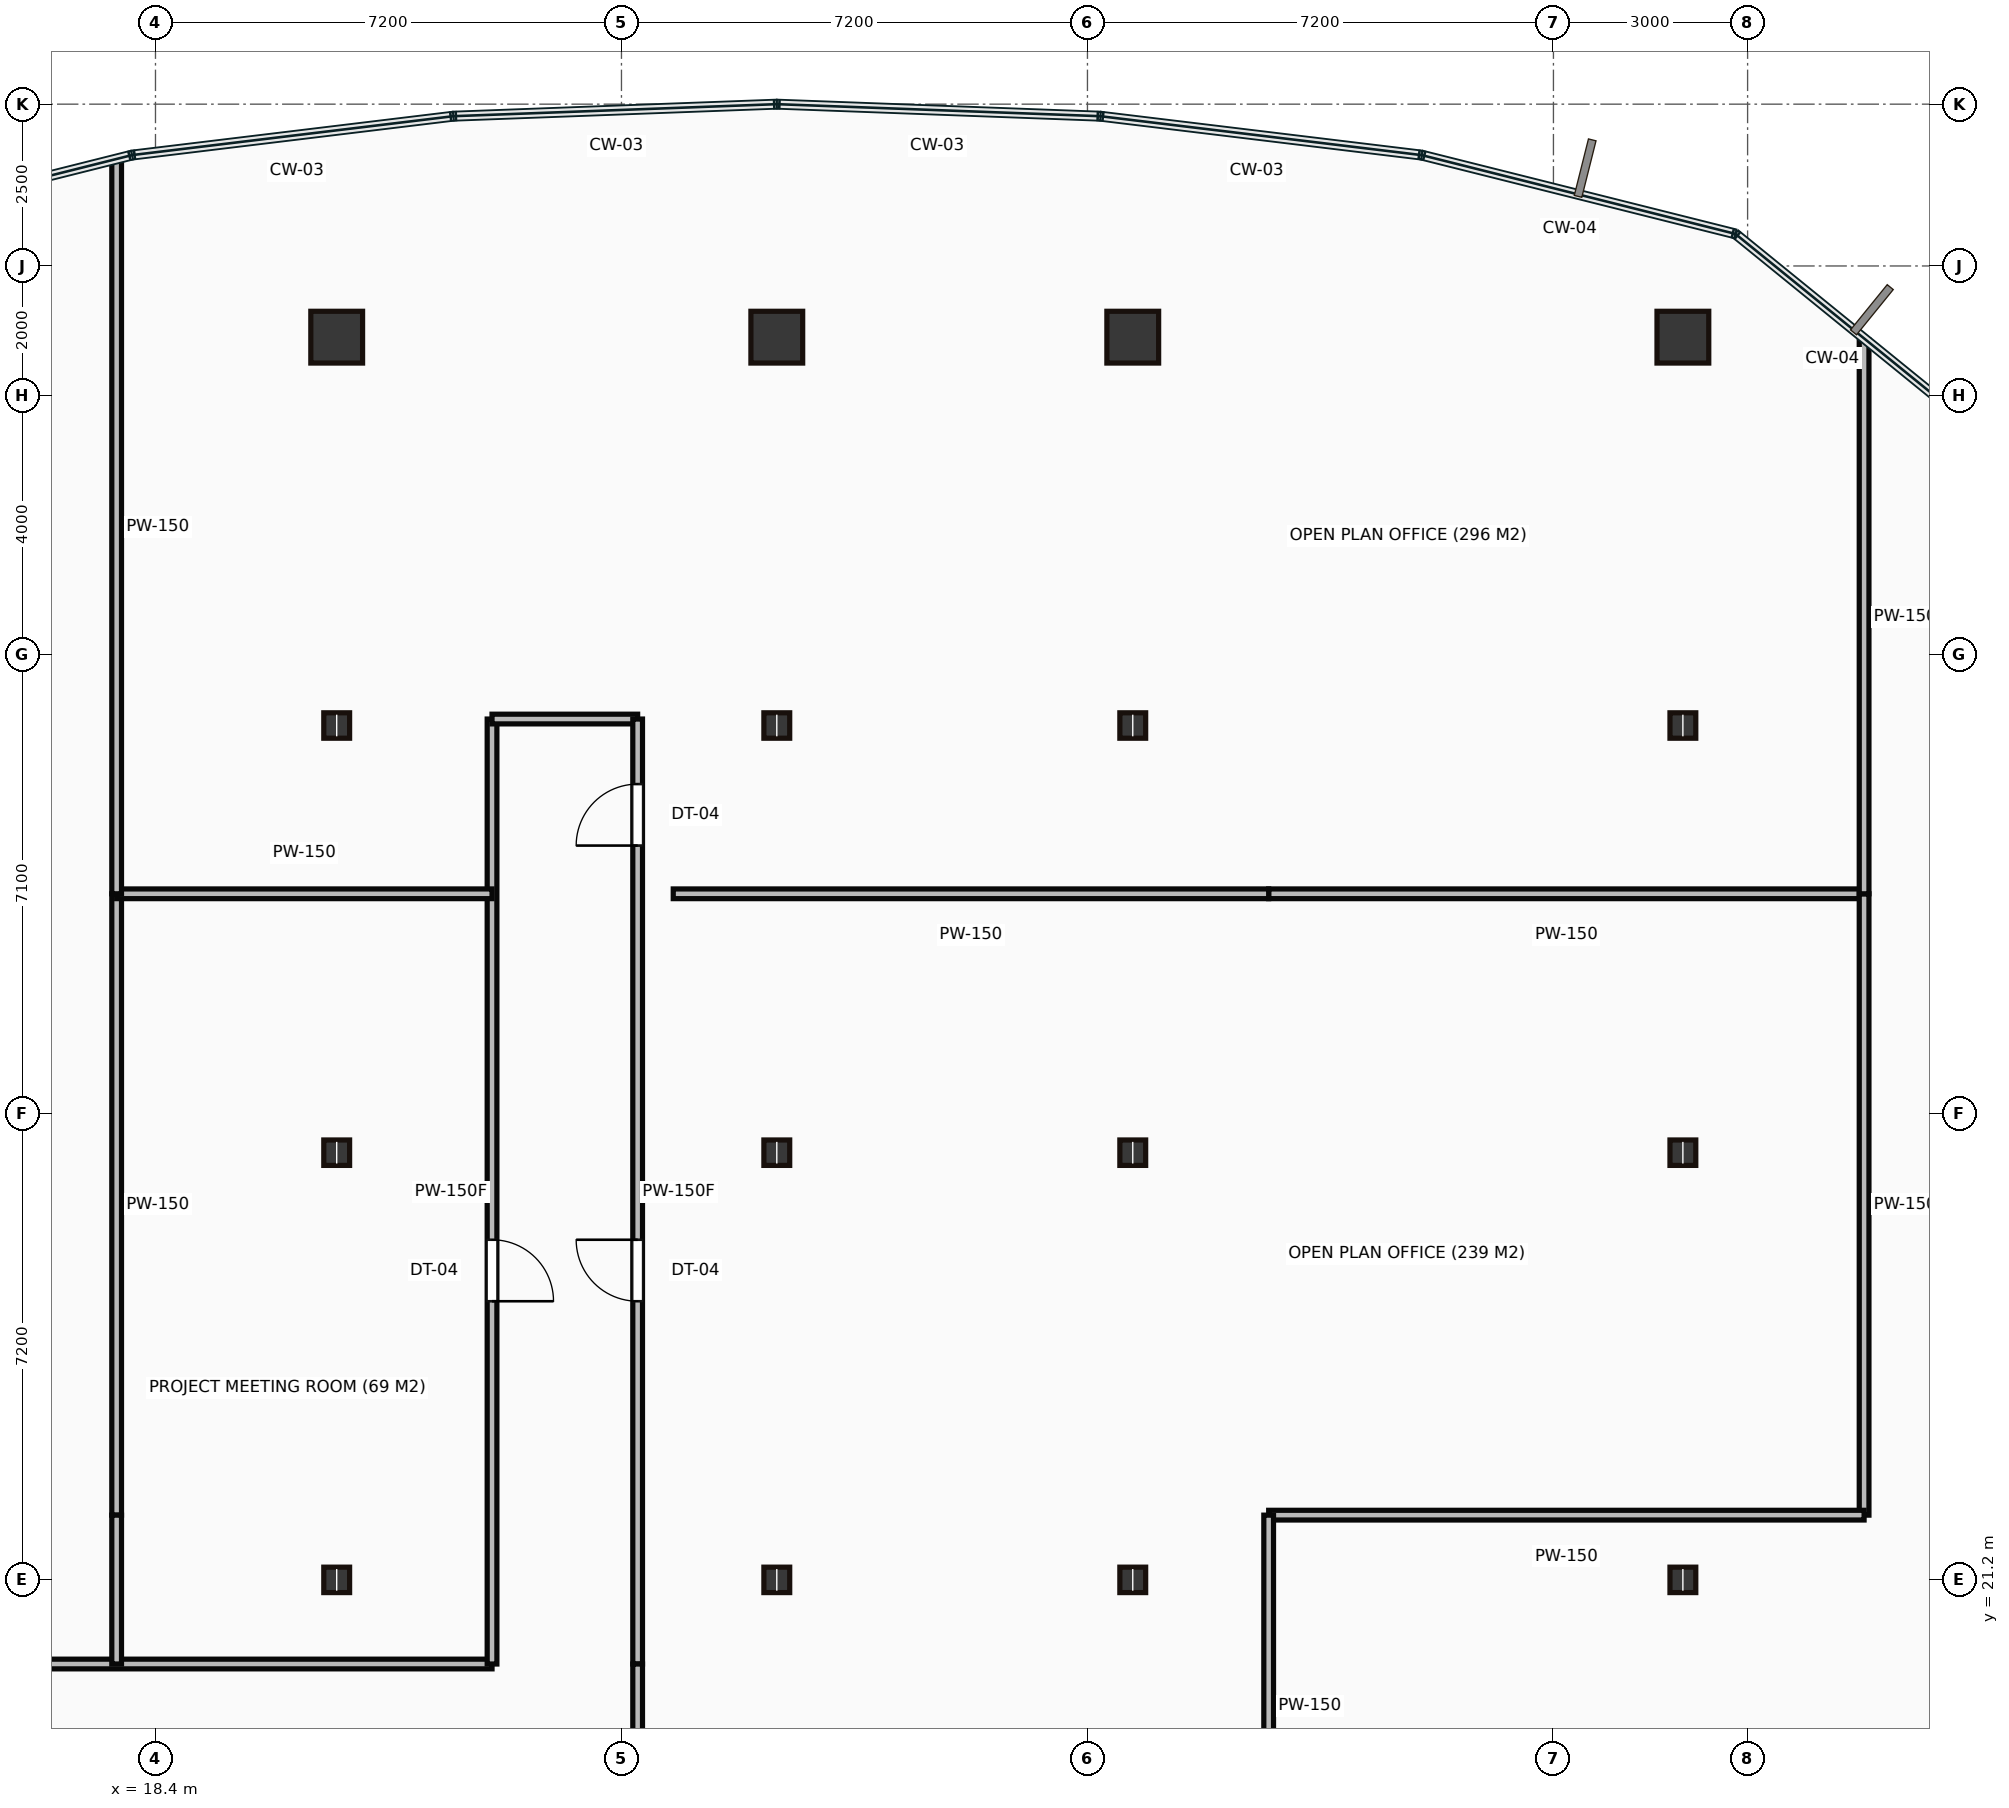
"""IFC4 building model, lengths in metres.
Left out: names, types, materials, properties, quantities, classifications, styles, units other than length and angle.
Written with IfcOpenShell. Run it as: python <this file> out.ifc"""

import sys

from ifc_helpers import new_model, si_unit, direction, frame, frame_2d, origin, origin_2d, place, context, subcontext, project, spatial, rectangle, hollow_rectangle, i_section, extrude, source, transform, mapped, element, fill, save


model = new_model("IFC4")
c1 = context("Model", 3, precision=1e-05, world=origin(), true_north=direction((0.0, 1.0)))
c2 = subcontext(c1, "Body", "Model", "MODEL_VIEW")
j1 = project(units=[si_unit("LENGTHUNIT", "METRE"), si_unit("PLANEANGLEUNIT", "RADIAN")], contexts=[c1])
p1 = place(None, origin())
s1 = spatial("IfcSite", under=j1, at=p1, CompositionType="ELEMENT")
p2 = place(p1, origin())
s2 = spatial("IfcBuilding", under=s1, at=p2, CompositionType="ELEMENT")
p3 = place(p2, frame((0.0, 0.0, 114.2)))
s3 = spatial("IfcBuildingStorey", under=s2, at=p3, CompositionType="ELEMENT", Elevation=114.2)
m1 = source(origin(), c2, "Body", "SweptSolid", [
    extrude(i_section(OverallWidth=0.399, OverallDepth=0.393, WebThickness=0.023, FlangeThickness=0.037, at=origin_2d()), origin(), (0.0, 0.0, 1.0), 3.65),
])
for number, where, z_axis, x_axis in (
    (1, (21.2, 21.2, 0.0), (0.0, 0.0, 1.0), (1.0, 0.0, 0.0)),
    (2, (21.2, 27.8, 0.0), (0.0, 0.0, 1.0), (1.0, 0.0, 0.0)),
    (3, (21.2, 34.4, 0.0), (0.0, 0.0, 1.0), (1.0, 0.0, 0.0)),
):
    element("IfcColumn", number, at=place(p3, frame(where, z_axis=z_axis, x_axis=x_axis)), inside=s3, PredefinedType="COLUMN", context=c2, shape_type="MappedRepresentation", body=[
        mapped(m1, transform((0.0, 0.0, 0.0))),
    ])
m2 = source(origin(), c2, "Body", "SweptSolid", [
    extrude(hollow_rectangle(XDim=0.8, YDim=0.8, WallThickness=0.04, at=origin_2d()), origin(), (0.0, 0.0, 1.0), 3.65),
])
p4 = place(p3, frame((21.2, 40.4, 0.0), z_axis=(0.0, 0.0, 1.0), x_axis=(1.0, 0.0, 0.0)))
e4 = element("IfcColumn", 4, at=p4, inside=s3, PredefinedType="COLUMN", context=c2, shape_type="MappedRepresentation", body=[
    mapped(m2, transform((0.0, 0.0, 0.0))),
])
for number, where, z_axis, x_axis in (
    (5, (28.0, 21.2, 0.0), (0.0, 0.0, 1.0), (1.0, 0.0, 0.0)),
    (6, (28.0, 27.8, 0.0), (0.0, 0.0, 1.0), (1.0, 0.0, 0.0)),
    (7, (28.0, 34.4, 0.0), (0.0, 0.0, 1.0), (1.0, 0.0, 0.0)),
):
    element("IfcColumn", number, at=place(p3, frame(where, z_axis=z_axis, x_axis=x_axis)), inside=s3, PredefinedType="COLUMN", context=c2, shape_type="MappedRepresentation", body=[
        mapped(m1, transform((0.0, 0.0, 0.0))),
    ])
p5 = place(p3, frame((28.0, 40.4, 0.0), z_axis=(0.0, 0.0, 1.0), x_axis=(1.0, 0.0, 0.0)))
e8 = element("IfcColumn", 8, at=p5, inside=s3, PredefinedType="COLUMN", context=c2, shape_type="MappedRepresentation", body=[
    mapped(m2, transform((0.0, 0.0, 0.0))),
])
for number, where, z_axis, x_axis in (
    (9, (33.5, 21.2, 0.0), (0.0, 0.0, 1.0), (1.0, 0.0, 0.0)),
    (10, (33.5, 27.8, 0.0), (0.0, 0.0, 1.0), (1.0, 0.0, 0.0)),
    (11, (33.5, 34.4, 0.0), (0.0, 0.0, 1.0), (1.0, 0.0, 0.0)),
):
    element("IfcColumn", number, at=place(p3, frame(where, z_axis=z_axis, x_axis=x_axis)), inside=s3, PredefinedType="COLUMN", context=c2, shape_type="MappedRepresentation", body=[
        mapped(m1, transform((0.0, 0.0, 0.0))),
    ])
p6 = place(p3, frame((33.5, 40.4, 0.0), z_axis=(0.0, 0.0, 1.0), x_axis=(1.0, 0.0, 0.0)))
e12 = element("IfcColumn", 12, at=p6, inside=s3, PredefinedType="COLUMN", context=c2, shape_type="MappedRepresentation", body=[
    mapped(m2, transform((0.0, 0.0, 0.0))),
])
for number, where, z_axis, x_axis in (
    (13, (42.0, 21.2, 0.0), (0.0, 0.0, 1.0), (1.0, 0.0, 0.0)),
    (14, (42.0, 27.8, 0.0), (0.0, 0.0, 1.0), (1.0, 0.0, 0.0)),
    (15, (42.0, 34.4, 0.0), (0.0, 0.0, 1.0), (1.0, 0.0, 0.0)),
):
    element("IfcColumn", number, at=place(p3, frame(where, z_axis=z_axis, x_axis=x_axis)), inside=s3, PredefinedType="COLUMN", context=c2, shape_type="MappedRepresentation", body=[
        mapped(m1, transform((0.0, 0.0, 0.0))),
    ])
p7 = place(p3, frame((42.0, 40.4, 0.0), z_axis=(0.0, 0.0, 1.0), x_axis=(1.0, 0.0, 0.0)))
e16 = element("IfcColumn", 16, at=p7, inside=s3, PredefinedType="COLUMN", context=c2, shape_type="MappedRepresentation", body=[
    mapped(m2, transform((0.0, 0.0, 0.0))),
])
m3 = source(origin(), c2, "Body", "SweptSolid", [
    extrude(rectangle(XDim=19.0, YDim=0.15, at=frame_2d((9.5, 0.0))), origin(), (0.0, 0.0, 1.0), 3.4),
])
p8 = place(p3, frame((4.6, 19.9, 0.0), z_axis=(0.0, 0.0, 1.0), x_axis=(1.0, 0.0, 0.0)))
e17 = element("IfcWall", 17, at=p8, inside=s3, PredefinedType="PARTITIONING", context=c2, shape_type="MappedRepresentation", body=[
    mapped(m3, transform((0.0, 0.0, 0.0))),
])
m4 = source(origin(), c2, "Body", "SweptSolid", [
    extrude(rectangle(XDim=14.6, YDim=0.15, at=frame_2d((7.3, 0.0))), origin(), (0.0, 0.0, 1.0), 3.4),
])
p9 = place(p3, frame((23.6, 19.9, 0.0), z_axis=(0.0, 0.0, 1.0), x_axis=(0.0, 1.0, 0.0)))
e18 = element("IfcWall", 18, at=p9, inside=s3, PredefinedType="PARTITIONING", context=c2, shape_type="MappedRepresentation", body=[
    mapped(m4, transform((0.0, 0.0, 0.0))),
])
p10 = place(p9, frame((5.605, 0.0, 0.0)))
e19 = element("IfcOpeningElement", 19, at=p10, cuts=e18, PredefinedType="OPENING", context=c2, shape_type="SweptSolid", body=[
    extrude(rectangle(XDim=0.95, YDim=2.15, at=frame_2d((0.475, 1.075))), frame((0.0, 0.085, 0.0), z_axis=(0.0, -1.0, 0.0), x_axis=(1.0, 0.0, 0.0)), (0.0, 0.0, 1.0), 0.17),
])
m5 = source(origin(), c2, "Body", "SweptSolid", [
    extrude(rectangle(XDim=2.25, YDim=0.15, at=frame_2d((1.125, 0.0))), origin(), (0.0, 0.0, 1.0), 2.702),
])
p11 = place(p3, frame((23.6, 34.5, 0.0), z_axis=(0.0, 0.0, 1.0), x_axis=(1.0, 0.0, 0.0)))
e20 = element("IfcWall", 20, at=p11, inside=s3, PredefinedType="PARTITIONING", context=c2, shape_type="MappedRepresentation", body=[
    mapped(m5, transform((0.0, 0.0, 0.0))),
])
p12 = place(p3, frame((25.85, 34.5, 0.0), z_axis=(0.0, 0.0, 1.0), x_axis=(0.0, -1.0, 0.0)))
e21 = element("IfcWall", 21, at=p12, inside=s3, PredefinedType="PARTITIONING", context=c2, shape_type="MappedRepresentation", body=[
    mapped(m4, transform((0.0, 0.0, 0.0))),
])
p13 = place(p12, frame((1.005, 0.0, 0.0)))
e22 = element("IfcOpeningElement", 22, at=p13, cuts=e21, PredefinedType="OPENING", context=c2, shape_type="SweptSolid", body=[
    extrude(rectangle(XDim=0.95, YDim=2.15, at=frame_2d((0.475, 1.075))), frame((0.0, 0.085, 0.0), z_axis=(0.0, -1.0, 0.0), x_axis=(1.0, 0.0, 0.0)), (0.0, 0.0, 1.0), 0.17),
])
p14 = place(p12, frame((8.045, 0.0, 0.0)))
e23 = element("IfcOpeningElement", 23, at=p14, cuts=e21, PredefinedType="OPENING", context=c2, shape_type="SweptSolid", body=[
    extrude(rectangle(XDim=0.95, YDim=2.15, at=frame_2d((0.475, 1.075))), frame((0.0, 0.085, 0.0), z_axis=(0.0, -1.0, 0.0), x_axis=(1.0, 0.0, 0.0)), (0.0, 0.0, 1.0), 0.17),
])
m6 = source(origin(), c2, "Body", "SweptSolid", [
    extrude(rectangle(XDim=2.1, YDim=0.15, at=frame_2d((1.05, 0.0))), origin(), (0.0, 0.0, 1.0), 3.4),
])
p15 = place(p3, frame((25.85, 19.9, 0.0), z_axis=(0.0, 0.0, 1.0), x_axis=(0.0, -1.0, 0.0)))
e24 = element("IfcWall", 24, at=p15, inside=s3, PredefinedType="PARTITIONING", context=c2, shape_type="MappedRepresentation", body=[
    mapped(m6, transform((0.0, 0.0, 0.0))),
])
m7 = source(origin(), c2, "Body", "SweptSolid", [
    extrude(rectangle(XDim=9.6, YDim=0.15, at=frame_2d((4.8, 0.0))), origin(), (0.0, 0.0, 1.0), 3.4),
])
p16 = place(p3, frame((17.8, 31.8, 0.0), z_axis=(0.0, 0.0, 1.0), x_axis=(0.0, -1.0, 0.0)))
e25 = element("IfcWall", 25, at=p16, inside=s3, PredefinedType="PARTITIONING", context=c2, shape_type="MappedRepresentation", body=[
    mapped(m7, transform((0.0, 0.0, 0.0))),
])
m8 = source(origin(), c2, "Body", "SweptSolid", [
    extrude(rectangle(XDim=2.3, YDim=0.15, at=frame_2d((1.15, 0.0))), origin(), (0.0, 0.0, 1.0), 3.4),
])
p17 = place(p3, frame((17.8, 22.2, 0.0), z_axis=(0.0, 0.0, 1.0), x_axis=(0.0, -1.0, 0.0)))
e26 = element("IfcWall", 26, at=p17, inside=s3, PredefinedType="PARTITIONING", context=c2, shape_type="MappedRepresentation", body=[
    mapped(m8, transform((0.0, 0.0, 0.0))),
])
m9 = source(origin(), c2, "Body", "SweptSolid", [
    extrude(rectangle(XDim=5.8, YDim=0.15, at=frame_2d((2.9, 0.0))), origin(), (0.0, 0.0, 1.0), 3.4),
])
p18 = place(p3, frame((17.8, 31.8, 0.0), z_axis=(0.0, 0.0, 1.0), x_axis=(1.0, 0.0, 0.0)))
e27 = element("IfcWall", 27, at=p18, inside=s3, PredefinedType="PARTITIONING", context=c2, shape_type="MappedRepresentation", body=[
    mapped(m9, transform((0.0, 0.0, 0.0))),
])
m10 = source(origin(), c2, "Body", "SweptSolid", [
    extrude(rectangle(XDim=11.333, YDim=0.15, at=frame_2d((5.667, 0.0))), origin(), (0.0, 0.0, 1.0), 3.4),
])
p19 = place(p3, frame((17.8, 43.133, 0.0), z_axis=(0.0, 0.0, 1.0), x_axis=(0.0, -1.0, 0.0)))
e28 = element("IfcWall", 28, at=p19, inside=s3, PredefinedType="PARTITIONING", context=c2, shape_type="MappedRepresentation", body=[
    mapped(m10, transform((0.0, 0.0, 0.0))),
])
m11 = source(origin(), c2, "Body", "SweptSolid", [
    extrude(rectangle(XDim=9.2, YDim=0.15, at=frame_2d((4.6, 0.0))), origin(), (0.0, 0.0, 1.0), 3.4),
])
p20 = place(p3, frame((44.8, 31.8, 0.0), z_axis=(0.0, 0.0, 1.0), x_axis=(-1.0, 0.0, 0.0)))
e29 = element("IfcWall", 29, at=p20, inside=s3, PredefinedType="PARTITIONING", context=c2, shape_type="MappedRepresentation", body=[
    mapped(m11, transform((0.0, 0.0, 0.0))),
])
m12 = source(origin(), c2, "Body", "SweptSolid", [
    extrude(rectangle(XDim=9.2, YDim=0.15, at=frame_2d((4.6, 0.0))), origin(), (0.0, 0.0, 1.0), 3.4),
])
p21 = place(p3, frame((35.6, 31.8, 0.0), z_axis=(0.0, 0.0, 1.0), x_axis=(-1.0, 0.0, 0.0)))
e30 = element("IfcWall", 30, at=p21, inside=s3, PredefinedType="PARTITIONING", context=c2, shape_type="MappedRepresentation", body=[
    mapped(m12, transform((0.0, 0.0, 0.0))),
])
p22 = place(p3, frame((44.8, 31.8, 0.0), z_axis=(0.0, 0.0, 1.0), x_axis=(0.0, -1.0, 0.0)))
e31 = element("IfcWall", 31, at=p22, inside=s3, PredefinedType="PARTITIONING", context=c2, shape_type="MappedRepresentation", body=[
    mapped(m7, transform((0.0, 0.0, 0.0))),
])
p23 = place(p3, frame((44.8, 22.2, 0.0), z_axis=(0.0, 0.0, 1.0), x_axis=(-1.0, 0.0, 0.0)))
e32 = element("IfcWall", 32, at=p23, inside=s3, PredefinedType="PARTITIONING", context=c2, shape_type="MappedRepresentation", body=[
    mapped(m11, transform((0.0, 0.0, 0.0))),
])
m13 = source(origin(), c2, "Body", "SweptSolid", [
    extrude(rectangle(XDim=5.9, YDim=0.15, at=frame_2d((2.95, 0.0))), origin(), (0.0, 0.0, 1.0), 3.4),
])
p24 = place(p3, frame((35.6, 22.2, 0.0), z_axis=(0.0, 0.0, 1.0), x_axis=(0.0, -1.0, 0.0)))
e33 = element("IfcWall", 33, at=p24, inside=s3, PredefinedType="PARTITIONING", context=c2, shape_type="MappedRepresentation", body=[
    mapped(m13, transform((0.0, 0.0, 0.0))),
])
m14 = source(origin(), c2, "Body", "SweptSolid", [
    extrude(rectangle(XDim=8.555, YDim=0.15, at=frame_2d((4.277, 0.0))), origin(), (0.0, 0.0, 1.0), 3.4),
])
p25 = place(p3, frame((44.8, 40.355, 0.0), z_axis=(0.0, 0.0, 1.0), x_axis=(0.0, -1.0, 0.0)))
e34 = element("IfcWall", 34, at=p25, inside=s3, PredefinedType="PARTITIONING", context=c2, shape_type="MappedRepresentation", body=[
    mapped(m14, transform((0.0, 0.0, 0.0))),
])
m15 = source(origin(), c2, "Body", "SweptSolid", [
    extrude(rectangle(XDim=0.95, YDim=2.15, at=frame_2d((0.475, 1.075))), frame((0.0, 0.025, 0.0), z_axis=(0.0, -1.0, 0.0), x_axis=(1.0, 0.0, 0.0)), (0.0, 0.0, 1.0), 0.05),
])
p26 = place(p10, origin())
e35 = element("IfcDoor", 35, at=p26, inside=s3, OperationType="SINGLE_SWING_LEFT", PredefinedType="DOOR", context=c2, shape_type="MappedRepresentation", body=[
    mapped(m15, transform((0.0, 0.0, 0.0))),
])
fill(e19, e35)
p27 = place(p13, origin())
e36 = element("IfcDoor", 36, at=p27, inside=s3, OperationType="SINGLE_SWING_RIGHT", PredefinedType="DOOR", context=c2, shape_type="MappedRepresentation", body=[
    mapped(m15, transform((0.0, 0.0, 0.0))),
])
fill(e22, e36)
p28 = place(p14, origin())
e37 = element("IfcDoor", 37, at=p28, inside=s3, OperationType="SINGLE_SWING_LEFT", PredefinedType="DOOR", context=c2, shape_type="MappedRepresentation", body=[
    mapped(m15, transform((0.0, 0.0, 0.0))),
])
fill(e23, e37)
save(model, sys.argv[1])
